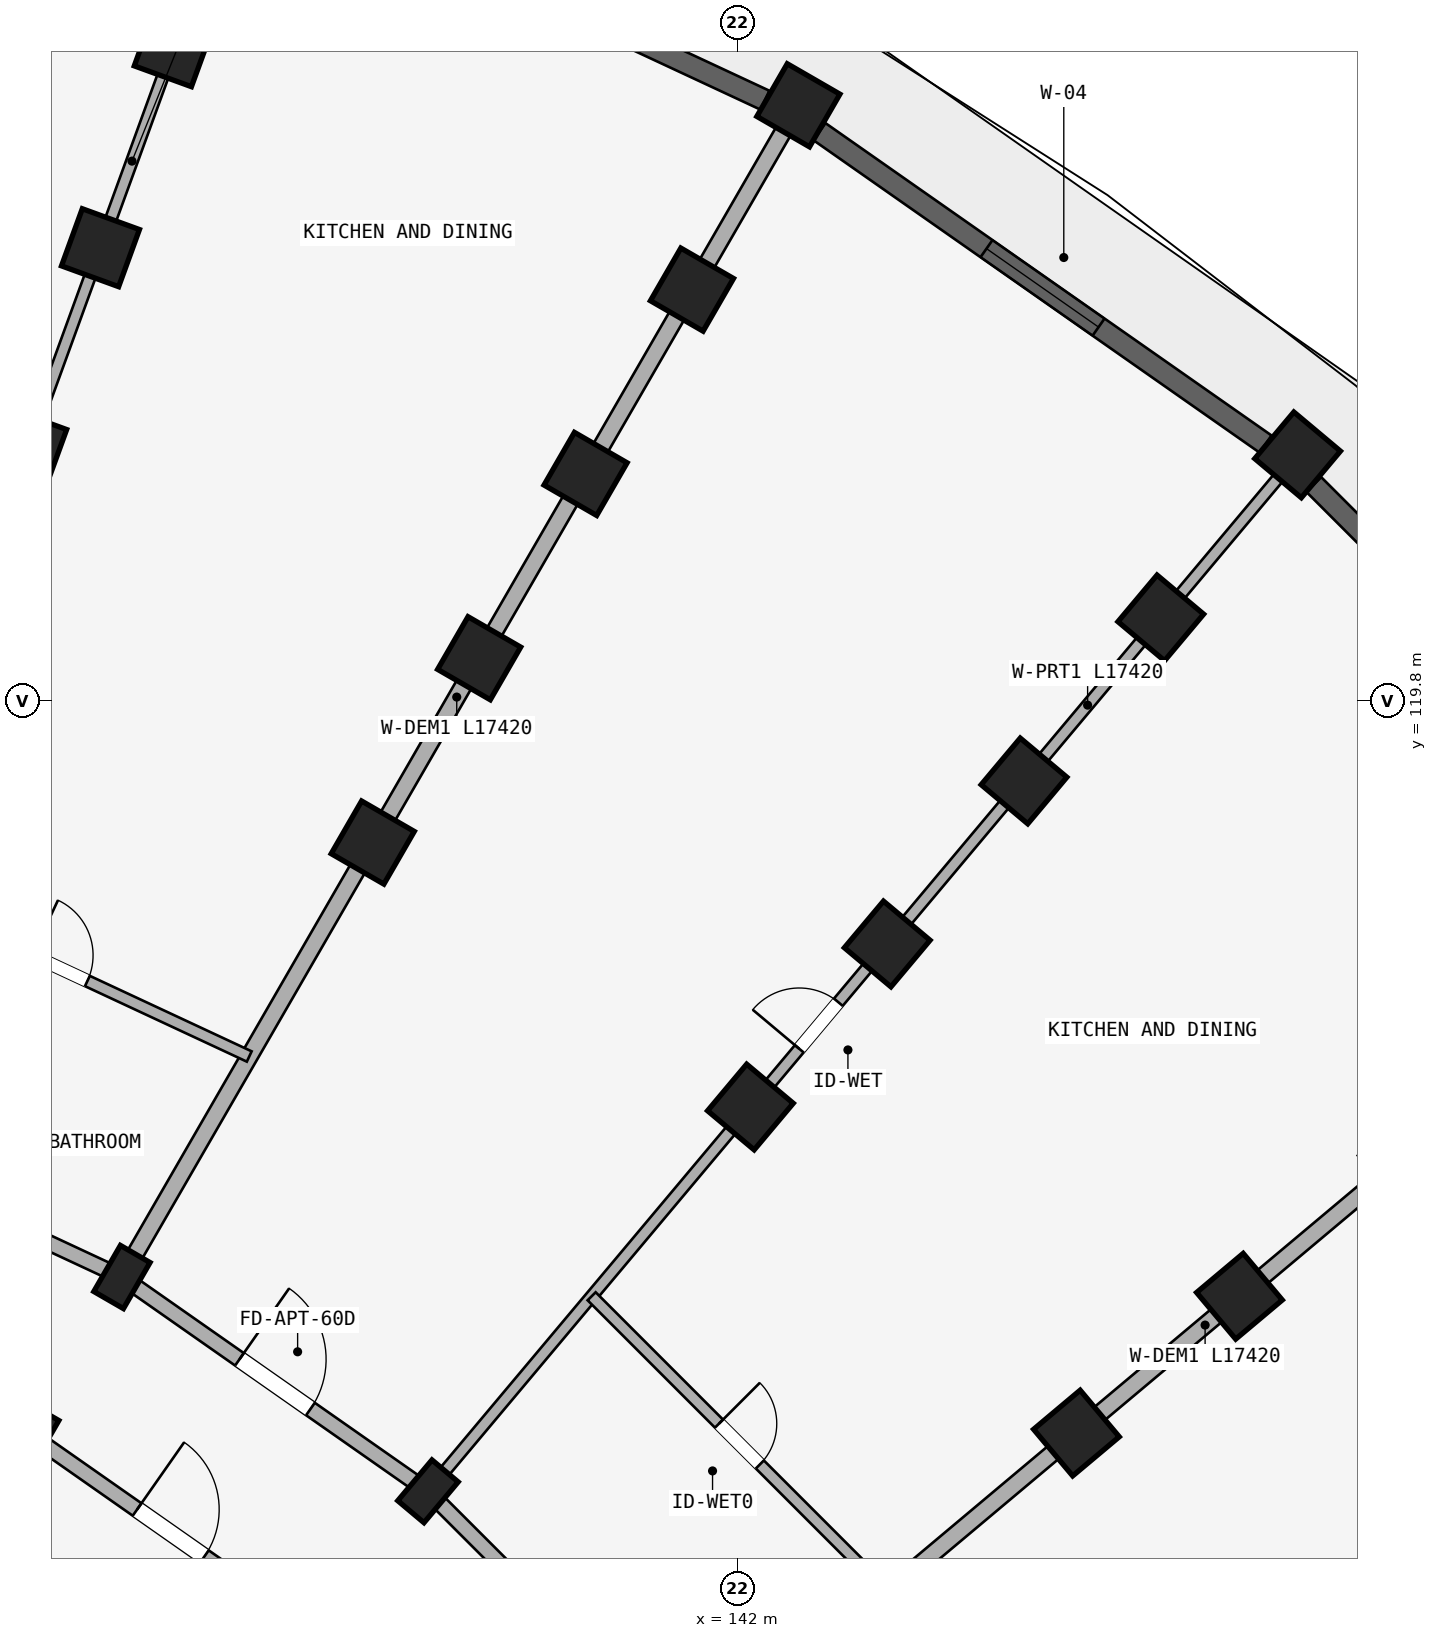
"""IFC4 building model, lengths in metres.
Left out: names, types, materials, properties, quantities, classifications, styles, units other than length and angle.
Written with IfcOpenShell. Run it as: python <this file> out.ifc"""

import sys

from ifc_helpers import new_model, si_unit, direction, frame, frame_2d, origin, origin_2d, place, context, subcontext, project, spatial, rectangle, extrude, element, fill, save


model = new_model("IFC4")
c1 = context("Model", 3, precision=1e-05, world=origin(), true_north=direction((0.0, 1.0)))
c2 = subcontext(c1, "Body", "Model", "MODEL_VIEW")
j1 = project(units=[si_unit("LENGTHUNIT", "METRE"), si_unit("PLANEANGLEUNIT", "RADIAN")], contexts=[c1])
p1 = place(None, origin())
s1 = spatial("IfcSite", under=j1, at=p1, CompositionType="ELEMENT")
p2 = place(p1, origin())
s2 = spatial("IfcBuilding", under=s1, at=p2, CompositionType="ELEMENT")
p3 = place(p2, frame((0.0, 0.0, 15.0)))
s3 = spatial("IfcBuildingStorey", under=s2, at=p3, CompositionType="ELEMENT", Elevation=15.0)
for number, where, z_axis, x_axis in (
    (1, (132.66, 123.132, 0.0), (0.0, 0.0, 1.0), (-0.94, 0.342, 0.0)),
    (2, (133.618, 125.764, 0.0), (0.0, 0.0, 1.0), (-0.94, 0.342, 0.0)),
    (3, (134.575, 128.395, 0.0), (0.0, 0.0, 1.0), (-0.94, 0.342, 0.0)),
):
    element("IfcColumn", number, at=place(p3, frame(where, z_axis=z_axis, x_axis=x_axis)), inside=s3, PredefinedType="COLUMN", context=c2, shape_type="SweptSolid", body=[
        extrude(rectangle(XDim=0.8, YDim=0.8, at=origin_2d()), origin(), (0.0, 0.0, 1.0), 2.93),
    ])
for number, where, z_axis, x_axis in (
    (4, (132.7, 110.144, 0.0), (0.0, 0.0, 1.0), (-0.866, 0.5, 0.0)),
    (5, (133.9, 112.222, 0.0), (0.0, 0.0, 1.0), (-0.866, 0.5, 0.0)),
):
    element("IfcColumn", number, at=place(p3, frame(where, z_axis=z_axis, x_axis=x_axis)), inside=s3, PredefinedType="COLUMN", context=c2, shape_type="SweptSolid", body=[
        extrude(rectangle(XDim=0.45, YDim=0.7, at=origin_2d()), origin(), (0.0, 0.0, 1.0), 2.93),
    ])
for number, where, z_axis, x_axis in (
    (6, (137.2, 117.938, 0.0), (0.0, 0.0, 1.0), (-0.866, 0.5, 0.0)),
    (7, (138.6, 120.363, 0.0), (0.0, 0.0, 1.0), (-0.866, 0.5, 0.0)),
    (8, (140.0, 122.787, 0.0), (0.0, 0.0, 1.0), (-0.866, 0.5, 0.0)),
    (9, (141.4, 125.212, 0.0), (0.0, 0.0, 1.0), (-0.866, 0.5, 0.0)),
    (10, (142.8, 127.637, 0.0), (0.0, 0.0, 1.0), (-0.866, 0.5, 0.0)),
):
    element("IfcColumn", number, at=place(p3, frame(where, z_axis=z_axis, x_axis=x_axis)), inside=s3, PredefinedType="COLUMN", context=c2, shape_type="SweptSolid", body=[
        extrude(rectangle(XDim=0.8, YDim=0.8, at=origin_2d()), origin(), (0.0, 0.0, 1.0), 2.93),
    ])
p4 = place(p3, frame((137.927, 109.402, 0.0), z_axis=(0.0, 0.0, 1.0), x_axis=(-0.766044443119, 0.642787609687, 0.0)))
e11 = element("IfcColumn", 11, at=p4, inside=s3, PredefinedType="COLUMN", context=c2, shape_type="SweptSolid", body=[
    extrude(rectangle(XDim=0.45, YDim=0.7, at=origin_2d()), origin(), (0.0, 0.0, 1.0), 2.93),
])
for number, where, z_axis, x_axis in (
    (12, (142.169, 114.458, 0.0), (0.0, 0.0, 1.0), (-0.766, 0.643, 0.0)),
    (13, (143.969, 116.603, 0.0), (0.0, 0.0, 1.0), (-0.766, 0.643, 0.0)),
    (14, (145.769, 118.748, 0.0), (0.0, 0.0, 1.0), (-0.766, 0.643, 0.0)),
    (15, (147.568, 120.893, 0.0), (0.0, 0.0, 1.0), (-0.766, 0.643, 0.0)),
    (16, (149.368, 123.038, 0.0), (0.0, 0.0, 1.0), (-0.766, 0.643, 0.0)),
    (17, (146.458, 110.169, 0.0), (0.0, 0.0, 1.0), (-0.643, 0.766, 0.0)),
    (18, (148.603, 111.969, 0.0), (0.0, 0.0, 1.0), (-0.643, 0.766, 0.0)),
):
    element("IfcColumn", number, at=place(p3, frame(where, z_axis=z_axis, x_axis=x_axis)), inside=s3, PredefinedType="COLUMN", context=c2, shape_type="SweptSolid", body=[
        extrude(rectangle(XDim=0.8, YDim=0.8, at=origin_2d()), origin(), (0.0, 0.0, 1.0), 2.93),
    ])
p5 = place(p3, frame((129.445, 114.299, 0.0), z_axis=(0.0, 0.0, 1.0), x_axis=(0.906302381024, -0.422629854778, 0.0)))
e19 = element("IfcWall", 19, at=p5, inside=s3, PredefinedType="STANDARD", context=c2, shape_type="SweptSolid", body=[
    extrude(rectangle(XDim=4.915, YDim=0.2, at=frame_2d((2.458, 0.0))), origin(), (0.0, 0.0, 1.0), 2.372),
])
p6 = place(p3, frame((132.7, 110.144, 0.0), z_axis=(0.0, 0.0, 1.0), x_axis=(0.819155404658, -0.573571637217, 0.0)))
e20 = element("IfcWall", 20, at=p6, inside=s3, PredefinedType="STANDARD", context=c2, shape_type="SweptSolid", body=[
    extrude(rectangle(XDim=4.497, YDim=0.2, at=frame_2d((2.249, 0.0))), origin(), (0.0, 0.0, 1.0), 2.372),
])
p7 = place(p6, frame((1.709, 0.0, 0.0)))
e21 = element("IfcOpeningElement", 21, at=p7, cuts=e20, PredefinedType="OPENING", context=c2, shape_type="SweptSolid", body=[
    extrude(rectangle(XDim=1.08, YDim=2.15, at=frame_2d((0.54, 1.075))), frame((0.0, 0.11, 0.0), z_axis=(0.0, -1.0, 0.0), x_axis=(1.0, 0.0, 0.0)), (0.0, 0.0, 1.0), 0.22),
])
p8 = place(p3, frame((133.9, 112.222, 0.0), z_axis=(0.0, 0.0, 1.0), x_axis=(0.819140911474, -0.573592335331, 0.0)))
e22 = element("IfcWall", 22, at=p8, inside=s3, PredefinedType="STANDARD", context=c2, shape_type="SweptSolid", body=[
    extrude(rectangle(XDim=4.916, YDim=0.2, at=frame_2d((2.458, 0.0))), origin(), (0.0, 0.0, 1.0), 2.372),
])
p9 = place(p8, frame((1.888, 0.0, 0.0)))
e23 = element("IfcOpeningElement", 23, at=p9, cuts=e22, PredefinedType="OPENING", context=c2, shape_type="SweptSolid", body=[
    extrude(rectangle(XDim=1.14, YDim=2.15, at=frame_2d((0.57, 1.075))), frame((0.0, 0.11, 0.0), z_axis=(0.0, -1.0, 0.0), x_axis=(1.0, 0.0, 0.0)), (0.0, 0.0, 1.0), 0.22),
])
p10 = place(p3, frame((137.927, 109.402, 0.0), z_axis=(0.0, 0.0, 1.0), x_axis=(0.707106781187, -0.707106781187, 0.0)))
e24 = element("IfcWall", 24, at=p10, inside=s3, PredefinedType="STANDARD", context=c2, shape_type="SweptSolid", body=[
    extrude(rectangle(XDim=4.916, YDim=0.2, at=frame_2d((2.458, 0.0))), origin(), (0.0, 0.0, 1.0), 2.372),
])
p11 = place(p3, frame((129.479, 114.393, 0.0), z_axis=(0.0, 0.0, 1.0), x_axis=(0.342022120477, 0.939691901159, 0.0)))
e25 = element("IfcWall", 25, at=p11, inside=s3, PredefinedType="PARTITIONING", context=c2, shape_type="SweptSolid", body=[
    extrude(rectangle(XDim=17.42, YDim=0.15, at=frame_2d((8.71, 0.0))), origin(), (0.0, 0.0, 1.0), 2.372),
])
p12 = place(p11, frame((7.5, 0.0, 0.0)))
e26 = element("IfcOpeningElement", 26, at=p12, cuts=e25, PredefinedType="OPENING", context=c2, shape_type="SweptSolid", body=[
    extrude(rectangle(XDim=0.8, YDim=2.1, at=frame_2d((0.4, 1.05))), frame((0.0, 0.085, 0.0), z_axis=(0.0, -1.0, 0.0), x_axis=(1.0, 0.0, 0.0)), (0.0, 0.0, 1.0), 0.17),
])
p13 = place(p3, frame((133.95, 112.309, 0.0), z_axis=(0.0, 0.0, 1.0), x_axis=(0.499997843263, 0.866026648973, 0.0)))
e27 = element("IfcWall", 27, at=p13, inside=s3, PredefinedType="STANDARD", context=c2, shape_type="SweptSolid", body=[
    extrude(rectangle(XDim=17.42, YDim=0.22, at=frame_2d((8.71, 0.0))), origin(), (0.0, 0.0, 1.0), 2.372),
])
p14 = place(p3, frame((137.991, 109.479, 0.0), z_axis=(0.0, 0.0, 1.0), x_axis=(0.642784757967, 0.766046835987, 0.0)))
e28 = element("IfcWall", 28, at=p14, inside=s3, PredefinedType="PARTITIONING", context=c2, shape_type="SweptSolid", body=[
    extrude(rectangle(XDim=17.42, YDim=0.15, at=frame_2d((8.71, 0.0))), origin(), (0.0, 0.0, 1.0), 2.372),
])
p15 = place(p14, frame((7.5, 0.0, 0.0)))
e29 = element("IfcOpeningElement", 29, at=p15, cuts=e28, PredefinedType="OPENING", context=c2, shape_type="SweptSolid", body=[
    extrude(rectangle(XDim=0.8, YDim=2.1, at=frame_2d((0.4, 1.05))), frame((0.0, 0.085, 0.0), z_axis=(0.0, -1.0, 0.0), x_axis=(1.0, 0.0, 0.0)), (0.0, 0.0, 1.0), 0.17),
])
p16 = place(p3, frame((141.479, 105.991, 0.0), z_axis=(0.0, 0.0, 1.0), x_axis=(0.766046835987, 0.642784757967, 0.0)))
e30 = element("IfcWall", 30, at=p16, inside=s3, PredefinedType="STANDARD", context=c2, shape_type="SweptSolid", body=[
    extrude(rectangle(XDim=17.42, YDim=0.22, at=frame_2d((8.71, 0.0))), origin(), (0.0, 0.0, 1.0), 2.372),
])
p17 = place(p3, frame((144.309, 101.95, 0.0), z_axis=(0.0, 0.0, 1.0), x_axis=(0.866026648973, 0.499997843263, 0.0)))
e31 = element("IfcWall", 31, at=p17, inside=s3, PredefinedType="PARTITIONING", context=c2, shape_type="SweptSolid", body=[
    extrude(rectangle(XDim=17.42, YDim=0.15, at=frame_2d((8.71, 0.0))), origin(), (0.0, 0.0, 1.0), 2.372),
])
p18 = place(p17, frame((7.5, 0.0, 0.0)))
e32 = element("IfcOpeningElement", 32, at=p18, cuts=e31, PredefinedType="OPENING", context=c2, shape_type="SweptSolid", body=[
    extrude(rectangle(XDim=0.8, YDim=2.1, at=frame_2d((0.4, 1.05))), frame((0.0, 0.085, 0.0), z_axis=(0.0, -1.0, 0.0), x_axis=(1.0, 0.0, 0.0)), (0.0, 0.0, 1.0), 0.17),
])
p19 = place(p3, frame((130.591, 117.447, 0.0), z_axis=(0.0, 0.0, 1.0), x_axis=(0.906302189986, -0.422630264446, 0.0)))
e33 = element("IfcWall", 33, at=p19, inside=s3, PredefinedType="PLUMBINGWALL", context=c2, shape_type="SweptSolid", body=[
    extrude(rectangle(XDim=5.5, YDim=0.15, at=frame_2d((2.75, 0.0))), origin(), (0.0, 0.0, 1.0), 2.372),
])
p20 = place(p19, frame((2.35, 0.0, 0.0)))
e34 = element("IfcOpeningElement", 34, at=p20, cuts=e33, PredefinedType="OPENING", context=c2, shape_type="SweptSolid", body=[
    extrude(rectangle(XDim=0.8, YDim=2.1, at=frame_2d((0.4, 1.05))), frame((0.0, 0.085, 0.0), z_axis=(0.0, -1.0, 0.0), x_axis=(1.0, 0.0, 0.0)), (0.0, 0.0, 1.0), 0.17),
])
p21 = place(p3, frame((140.08, 111.969, 0.0), z_axis=(0.0, 0.0, 1.0), x_axis=(0.707106781187, -0.707106781187, 0.0)))
e35 = element("IfcWall", 35, at=p21, inside=s3, PredefinedType="PLUMBINGWALL", context=c2, shape_type="SweptSolid", body=[
    extrude(rectangle(XDim=5.5, YDim=0.15, at=frame_2d((2.75, 0.0))), origin(), (0.0, 0.0, 1.0), 2.372),
])
p22 = place(p21, frame((2.37, 0.0, 0.0)))
e36 = element("IfcOpeningElement", 36, at=p22, cuts=e35, PredefinedType="OPENING", context=c2, shape_type="SweptSolid", body=[
    extrude(rectangle(XDim=0.76, YDim=2.05, at=frame_2d((0.38, 1.025))), frame((0.0, 0.085, 0.0), z_axis=(0.0, -1.0, 0.0), x_axis=(1.0, 0.0, 0.0)), (0.0, 0.0, 1.0), 0.17),
])
p23 = place(p3, frame((135.867, 130.732, 0.0), z_axis=(0.0, 0.0, 1.0), x_axis=(0.906300636296, -0.422633596215, 0.0)))
e37 = element("IfcWall", 37, at=p23, inside=s3, PredefinedType="STANDARD", context=c2, shape_type="SweptSolid", body=[
    extrude(rectangle(XDim=7.164, YDim=0.275, at=frame_2d((3.582, 0.0))), origin(), (0.0, 0.0, 1.0), 2.472),
])
p24 = place(p23, frame((2.607, 0.0, 0.422)))
e38 = element("IfcOpeningElement", 38, at=p24, cuts=e37, PredefinedType="OPENING", context=c2, shape_type="SweptSolid", body=[
    extrude(rectangle(XDim=1.95, YDim=1.85, at=frame_2d((0.975, 0.925))), frame((0.0, 0.147, 0.0), z_axis=(0.0, -1.0, 0.0), x_axis=(1.0, 0.0, 0.0)), (0.0, 0.0, 1.0), 0.295),
])
p25 = place(p3, frame((143.078, 127.29, 0.0), z_axis=(0.0, 0.0, 1.0), x_axis=(0.819161471697, -0.573562972382, 0.0)))
e39 = element("IfcWall", 39, at=p25, inside=s3, PredefinedType="STANDARD", context=c2, shape_type="SweptSolid", body=[
    extrude(rectangle(XDim=7.164, YDim=0.275, at=frame_2d((3.582, 0.0))), origin(), (0.0, 0.0, 1.0), 2.472),
])
p26 = place(p25, frame((2.682, 0.0, 0.622)))
e40 = element("IfcOpeningElement", 40, at=p26, cuts=e39, PredefinedType="OPENING", context=c2, shape_type="SweptSolid", body=[
    extrude(rectangle(XDim=1.8, YDim=1.65, at=frame_2d((0.9, 0.825))), frame((0.0, 0.147, 0.0), z_axis=(0.0, -1.0, 0.0), x_axis=(1.0, 0.0, 0.0)), (0.0, 0.0, 1.0), 0.295),
])
p27 = place(p3, frame((149.582, 122.648, 0.0), z_axis=(0.0, 0.0, 1.0), x_axis=(0.707106781187, -0.707106781187, 0.0)))
e41 = element("IfcWall", 41, at=p27, inside=s3, PredefinedType="STANDARD", context=c2, shape_type="SweptSolid", body=[
    extrude(rectangle(XDim=7.164, YDim=0.275, at=frame_2d((3.582, 0.0))), origin(), (0.0, 0.0, 1.0), 2.472),
])
p28 = place(p27, frame((4.69, 0.0, 0.522)))
e42 = element("IfcOpeningElement", 42, at=p28, cuts=e41, PredefinedType="OPENING", context=c2, shape_type="SweptSolid", body=[
    extrude(rectangle(XDim=1.2, YDim=1.5, at=frame_2d((0.6, 0.75))), frame((0.0, 0.147, 0.0), z_axis=(0.0, -1.0, 0.0), x_axis=(1.0, 0.0, 0.0)), (0.0, 0.0, 1.0), 0.295),
])
p29 = place(p27, frame((1.907, 0.0, 0.0)))
e43 = element("IfcOpeningElement", 43, at=p29, cuts=e41, PredefinedType="OPENING", context=c2, shape_type="SweptSolid", body=[
    extrude(rectangle(XDim=1.2, YDim=2.15, at=frame_2d((0.6, 1.075))), frame((0.0, 0.147, 0.0), z_axis=(0.0, -1.0, 0.0), x_axis=(1.0, 0.0, 0.0)), (0.0, 0.0, 1.0), 0.295),
])
p30 = place(p26, origin())
e44 = element("IfcWindow", 44, at=p30, inside=s3, PartitioningType="DOUBLE_PANEL_VERTICAL", PredefinedType="WINDOW", context=c2, shape_type="SweptSolid", body=[
    extrude(rectangle(XDim=1.8, YDim=1.65, at=frame_2d((0.9, 0.825))), frame((0.0, 0.03, 0.0), z_axis=(0.0, -1.0, 0.0), x_axis=(1.0, 0.0, 0.0)), (0.0, 0.0, 1.0), 0.06),
])
fill(e40, e44)
p31 = place(p15, origin())
e45 = element("IfcDoor", 45, at=p31, inside=s3, OperationType="SINGLE_SWING_LEFT", PredefinedType="DOOR", context=c2, shape_type="SweptSolid", body=[
    extrude(rectangle(XDim=0.8, YDim=2.1, at=frame_2d((0.4, 1.05))), frame((0.0, 0.025, 0.0), z_axis=(0.0, -1.0, 0.0), x_axis=(1.0, 0.0, 0.0)), (0.0, 0.0, 1.0), 0.05),
])
fill(e29, e45)
p32 = place(p20, origin())
e46 = element("IfcDoor", 46, at=p32, inside=s3, OperationType="SINGLE_SWING_LEFT", PredefinedType="DOOR", context=c2, shape_type="SweptSolid", body=[
    extrude(rectangle(XDim=0.8, YDim=2.1, at=frame_2d((0.4, 1.05))), frame((0.0, 0.025, 0.0), z_axis=(0.0, -1.0, 0.0), x_axis=(1.0, 0.0, 0.0)), (0.0, 0.0, 1.0), 0.05),
])
fill(e34, e46)
p33 = place(p9, frame((1.14, 0.0, 0.0), z_axis=(0.0, 0.0, 1.0), x_axis=(-1.0, 0.0, 0.0)))
e47 = element("IfcDoor", 47, at=p33, inside=s3, OperationType="SINGLE_SWING_RIGHT", PredefinedType="DOOR", context=c2, shape_type="SweptSolid", body=[
    extrude(rectangle(XDim=1.14, YDim=2.15, at=frame_2d((0.57, 1.075))), frame((0.0, 0.025, 0.0), z_axis=(0.0, -1.0, 0.0), x_axis=(1.0, 0.0, 0.0)), (0.0, 0.0, 1.0), 0.05),
])
fill(e23, e47)
p34 = place(p22, origin())
e48 = element("IfcDoor", 48, at=p34, inside=s3, OperationType="SINGLE_SWING_LEFT", PredefinedType="DOOR", context=c2, shape_type="SweptSolid", body=[
    extrude(rectangle(XDim=0.76, YDim=2.05, at=frame_2d((0.38, 1.025))), frame((0.0, 0.025, 0.0), z_axis=(0.0, -1.0, 0.0), x_axis=(1.0, 0.0, 0.0)), (0.0, 0.0, 1.0), 0.05),
])
fill(e36, e48)
p35 = place(p7, origin())
e49 = element("IfcDoor", 49, at=p35, inside=s3, OperationType="SINGLE_SWING_LEFT", PredefinedType="DOOR", context=c2, shape_type="SweptSolid", body=[
    extrude(rectangle(XDim=1.08, YDim=2.15, at=frame_2d((0.54, 1.075))), frame((0.0, 0.025, 0.0), z_axis=(0.0, -1.0, 0.0), x_axis=(1.0, 0.0, 0.0)), (0.0, 0.0, 1.0), 0.05),
])
fill(e21, e49)
save(model, sys.argv[1])
